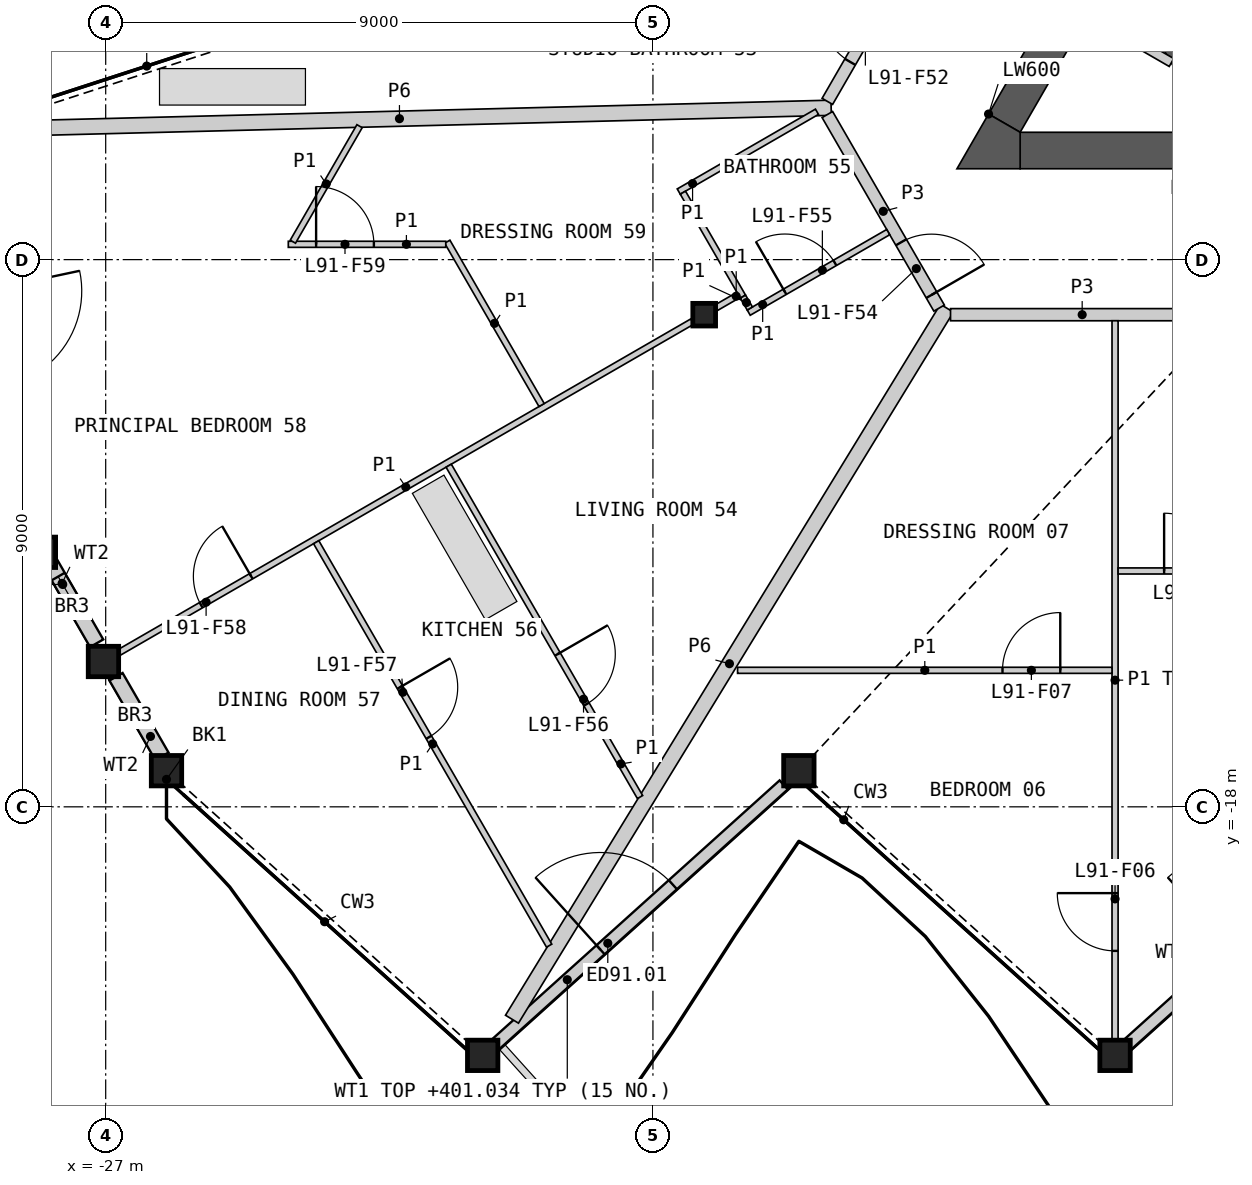
"""IFC4 building model, lengths in metres.
Left out: names, types, materials, properties, quantities, classifications, styles, units other than length and angle.
Written with IfcOpenShell. Run it as: python <this file> out.ifc"""

import sys

from ifc_helpers import new_model, si_unit, direction, frame, frame_2d, origin, origin_2d, place, context, subcontext, project, spatial, polyline, rectangle, hollow_rectangle, i_section, outline, extrude, element, fill, save


model = new_model("IFC4")
c1 = context("Model", 3, precision=1e-05, world=origin(), true_north=direction((0.0, 1.0)))
c2 = subcontext(c1, "Body", "Model", "MODEL_VIEW")
j1 = project(units=[si_unit("LENGTHUNIT", "METRE"), si_unit("PLANEANGLEUNIT", "RADIAN")], contexts=[c1])
p1 = place(None, origin())
s1 = spatial("IfcSite", under=j1, at=p1, CompositionType="ELEMENT")
p2 = place(p1, origin())
s2 = spatial("IfcBuilding", under=s1, at=p2, CompositionType="ELEMENT")
p3 = place(p2, frame((0.0, 0.0, 398.4)))
s3 = spatial("IfcBuildingStorey", under=s2, at=p3, CompositionType="ELEMENT", Elevation=398.4)
for number, where, z_axis, x_axis in (
    (1, (-26.0, -17.406, 0.0), (0.0, 0.0, 1.0), (1.0, 0.0, 0.0)),
    (2, (-20.8, -22.088, 0.0), (0.0, 0.0, 1.0), (1.0, 0.0, 0.0)),
    (3, (-15.6, -17.406, 0.0), (0.0, 0.0, 1.0), (1.0, 0.0, 0.0)),
    (4, (-10.4, -22.088, 0.0), (0.0, 0.0, 1.0), (1.0, 0.0, 0.0)),
    (5, (-28.074, -13.814, 0.0), (0.0, 0.0, 1.0), (1.0, 0.0, 0.0)),
    (6, (-27.037, -15.61, 0.0), (0.0, 0.0, 1.0), (1.0, 0.0, 0.0)),
):
    element("IfcColumn", number, at=place(p3, frame(where, z_axis=z_axis, x_axis=x_axis)), inside=s3, PredefinedType="COLUMN", context=c2, shape_type="SweptSolid", body=[
        extrude(hollow_rectangle(XDim=0.5, YDim=0.5, WallThickness=0.03, at=origin_2d()), origin(), (0.0, 0.0, 1.0), 3.4),
    ])
p4 = place(p3, frame((-17.157, -9.906, 0.0), z_axis=(0.0, 0.0, 1.0), x_axis=(1.0, 0.0, 0.0)))
e7 = element("IfcColumn", 7, at=p4, inside=s3, PredefinedType="COLUMN", context=c2, shape_type="SweptSolid", body=[
    extrude(i_section(OverallWidth=0.374, OverallDepth=0.372, WebThickness=0.016, FlangeThickness=0.026, at=origin_2d()), origin(), (0.0, 0.0, 1.0), 3.4),
])
p5 = place(p3, frame((-20.595, -21.912, 0.0), z_axis=(0.0, 0.0, 1.0), x_axis=(0.743132515916, 0.669144277259, 0.0)))
e8 = element("IfcWall", 8, at=p5, inside=s3, PredefinedType="SOLIDWALL", context=c2, shape_type="SweptSolid", body=[
    extrude(rectangle(XDim=6.385, YDim=0.2, at=frame_2d((3.192, 0.0))), origin(), (0.0, 0.0, 1.0), 2.634),
])
p6 = place(p5, frame((2.333, 0.0, 0.0)))
e9 = element("IfcOpeningElement", 9, at=p6, cuts=e8, PredefinedType="OPENING", context=c2, shape_type="SweptSolid", body=[
    extrude(rectangle(XDim=1.6, YDim=2.25, at=frame_2d((0.8, 1.125))), frame((0.0, 0.11, 0.0), z_axis=(0.0, -1.0, 0.0), x_axis=(1.0, 0.0, 0.0)), (0.0, 0.0, 1.0), 0.22),
])
p7 = place(p3, frame((-10.195, -21.912, 0.0), z_axis=(0.0, 0.0, 1.0), x_axis=(0.743132515916, 0.669144277259, 0.0)))
e10 = element("IfcWall", 10, at=p7, inside=s3, PredefinedType="SOLIDWALL", context=c2, shape_type="SweptSolid", body=[
    extrude(rectangle(XDim=6.385, YDim=0.2, at=frame_2d((3.192, 0.0))), origin(), (0.0, 0.0, 1.0), 2.634),
])
p8 = place(p7, frame((2.333, 0.0, 0.0)))
e11 = element("IfcOpeningElement", 11, at=p8, cuts=e10, PredefinedType="OPENING", context=c2, shape_type="SweptSolid", body=[
    extrude(rectangle(XDim=1.6, YDim=2.25, at=frame_2d((0.8, 1.125))), frame((0.0, 0.11, 0.0), z_axis=(0.0, -1.0, 0.0), x_axis=(1.0, 0.0, 0.0)), (0.0, 0.0, 1.0), 0.22),
])
p9 = place(p3, frame((-27.906, -13.997, 0.0), z_axis=(0.0, 0.0, 1.0), x_axis=(0.499931517724, -0.866064938435, 0.0)))
e12 = element("IfcWall", 12, at=p9, inside=s3, PredefinedType="SOLIDWALL", context=c2, shape_type="SweptSolid", body=[
    extrude(rectangle(XDim=1.516, YDim=0.25, at=frame_2d((0.758, 0.0))), origin(), (0.0, 0.0, 1.0), 2.634),
])
p10 = place(p9, frame((0.25, 0.0, 1.7)))
e13 = element("IfcOpeningElement", 13, at=p10, cuts=e12, PredefinedType="OPENING", context=c2, shape_type="SweptSolid", body=[
    extrude(rectangle(XDim=0.6, YDim=0.7, at=frame_2d((0.3, 0.35))), frame((0.0, 0.135, 0.0), z_axis=(0.0, -1.0, 0.0), x_axis=(1.0, 0.0, 0.0)), (0.0, 0.0, 1.0), 0.27),
])
p11 = place(p3, frame((-26.83, -15.861, 0.0), z_axis=(0.0, 0.0, 1.0), x_axis=(0.500048779063, -0.865997239347, 0.0)))
e14 = element("IfcWall", 14, at=p11, inside=s3, PredefinedType="SOLIDWALL", context=c2, shape_type="SweptSolid", body=[
    extrude(rectangle(XDim=1.511, YDim=0.25, at=frame_2d((0.755, 0.0))), origin(), (0.0, 0.0, 1.0), 2.634),
])
p12 = place(p3, origin())
e15 = element("IfcWall", 15, at=p12, inside=s3, PredefinedType="SHEAR", context=c2, shape_type="SweptSolid", body=[
    extrude(outline(polyline([(-10.374, -4.206), (-8.83, -6.881), (-8.738, -6.539), (-10.032, -4.298), (-10.374, -4.206)])), origin(), (0.0, 0.0, 1.0), 3.1),
])
p13 = place(p3, frame((-10.842, -4.967, 0.0), z_axis=(0.0, 0.0, 1.0), x_axis=(0.866098216386, -0.499873863663, 0.0)))
e16 = element("IfcWall", 16, at=p13, inside=s3, PredefinedType="PARTITIONING", context=c2, shape_type="SweptSolid", body=[
    extrude(rectangle(XDim=1.582, YDim=0.15, at=frame_2d((0.791, 0.0))), origin(), (0.0, 0.0, 1.0), 3.1),
])
p14 = place(p3, frame((-11.961, -7.206, 0.0), z_axis=(0.0, 0.0, 1.0), x_axis=(1.0, 0.0, 0.0)))
e17 = element("IfcWall", 17, at=p14, inside=s3, PredefinedType="SHEAR", context=c2, shape_type="SweptSolid", body=[
    extrude(rectangle(XDim=4.868, YDim=0.6, at=frame_2d((2.434, 0.0))), origin(), (0.0, 0.0, 1.0), 3.1),
])
p15 = place(p3, frame((-9.941, -2.807, 0.0), z_axis=(0.0, 0.0, 1.0), x_axis=(-0.500020646047, -0.866013483456, 0.0)))
e18 = element("IfcWall", 18, at=p15, inside=s3, PredefinedType="SHEAR", context=c2, shape_type="SweptSolid", body=[
    extrude(rectangle(XDim=4.559, YDim=0.6, at=frame_2d((2.28, 0.0))), origin(), (0.0, 0.0, 1.0), 3.1),
])
p16 = place(p3, origin())
e19 = element("IfcWall", 19, at=p16, inside=s3, PredefinedType="SHEAR", context=c2, shape_type="SweptSolid", body=[
    extrude(outline(polyline([(-12.48, -6.606), (-11.961, -6.906), (-11.961, -7.506), (-13.0, -7.506), (-12.48, -6.606)])), origin(), (0.0, 0.0, 1.0), 3.1),
])
p17 = place(p3, frame((-29.269, -6.862, 0.0), z_axis=(0.0, 0.0, 1.0), x_axis=(0.999679020594, 0.025334872878, 0.0)))
e20 = element("IfcWall", 20, at=p17, inside=s3, PredefinedType="PARTITIONING", context=c2, shape_type="SweptSolid", body=[
    extrude(rectangle(XDim=14.204, YDim=0.25, at=frame_2d((7.102, 0.0))), origin(), (0.0, 0.0, 1.0), 2.33),
])
p18 = place(p3, frame((-20.318, -21.493, 0.0), z_axis=(0.0, 0.0, 1.0), x_axis=(0.52177126778, 0.853085426039, 0.0)))
e21 = element("IfcWall", 21, at=p18, inside=s3, PredefinedType="PARTITIONING", context=c2, shape_type="SweptSolid", body=[
    extrude(rectangle(XDim=13.708, YDim=0.25, at=frame_2d((6.854, 0.0))), origin(), (0.0, 0.0, 1.0), 2.33),
])
p19 = place(p3, frame((-13.106, -9.906, 0.0), z_axis=(0.0, 0.0, 1.0), x_axis=(1.0, 0.0, 0.0)))
e22 = element("IfcWall", 22, at=p19, inside=s3, PredefinedType="PARTITIONING", context=c2, shape_type="SweptSolid", body=[
    extrude(rectangle(XDim=4.331, YDim=0.2, at=frame_2d((2.165, 0.0))), origin(), (0.0, 0.0, 1.0), 3.1),
])
p20 = place(p3, frame((-15.131, -6.397, 0.0), z_axis=(0.0, 0.0, 1.0), x_axis=(0.499986217557, 0.866033360935, 0.0)))
e23 = element("IfcWall", 23, at=p20, inside=s3, PredefinedType="PARTITIONING", context=c2, shape_type="SweptSolid", body=[
    extrude(rectangle(XDim=4.3, YDim=0.2, at=frame_2d((2.15, 0.0))), origin(), (0.0, 0.0, 1.0), 3.1),
])
p21 = place(p20, frame((0.75, 0.0, 0.0)))
e24 = element("IfcOpeningElement", 24, at=p21, cuts=e23, PredefinedType="OPENING", context=c2, shape_type="SweptSolid", body=[
    extrude(rectangle(XDim=1.0, YDim=2.1, at=frame_2d((0.5, 1.05))), frame((0.0, 0.11, 0.0), z_axis=(0.0, -1.0, 0.0), x_axis=(1.0, 0.0, 0.0)), (0.0, 0.0, 1.0), 0.22),
])
p22 = place(p3, frame((-15.131, -6.614, 0.0), z_axis=(0.0, 0.0, 1.0), x_axis=(0.499967746641, -0.866044024469, 0.0)))
e25 = element("IfcWall", 25, at=p22, inside=s3, PredefinedType="PARTITIONING", context=c2, shape_type="SweptSolid", body=[
    extrude(rectangle(XDim=3.676, YDim=0.2, at=frame_2d((1.838, 0.0))), origin(), (0.0, 0.0, 1.0), 3.1),
])
p23 = place(p22, frame((2.426, 0.0, 0.0)))
e26 = element("IfcOpeningElement", 26, at=p23, cuts=e25, PredefinedType="OPENING", context=c2, shape_type="SweptSolid", body=[
    extrude(rectangle(XDim=1.0, YDim=2.1, at=frame_2d((0.5, 1.05))), frame((0.0, 0.11, 0.0), z_axis=(0.0, -1.0, 0.0), x_axis=(1.0, 0.0, 0.0)), (0.0, 0.0, 1.0), 0.22),
])
p24 = place(p3, frame((-10.4, -21.828, 0.0), z_axis=(0.0, 0.0, 1.0), x_axis=(0.0, 1.0, 0.0)))
e27 = element("IfcWall", 27, at=p24, inside=s3, PredefinedType="PARTITIONING", context=c2, shape_type="SweptSolid", body=[
    extrude(rectangle(XDim=11.822, YDim=0.1, at=frame_2d((5.911, 0.0))), origin(), (0.0, 0.0, 1.0), 2.33),
])
p25 = place(p24, frame((1.458, 0.0, 0.0)))
e28 = element("IfcOpeningElement", 28, at=p25, cuts=e27, PredefinedType="OPENING", context=c2, shape_type="SweptSolid", body=[
    extrude(rectangle(XDim=0.95, YDim=2.1, at=frame_2d((0.475, 1.05))), frame((0.0, 0.06, 0.0), z_axis=(0.0, -1.0, 0.0), x_axis=(1.0, 0.0, 0.0)), (0.0, 0.0, 1.0), 0.12),
])
p26 = place(p3, frame((-26.777, -15.46, 0.0), z_axis=(0.0, 0.0, 1.0), x_axis=(0.866019680922, 0.500009912158, 0.0)))
e29 = element("IfcWall", 29, at=p26, inside=s3, PredefinedType="PARTITIONING", context=c2, shape_type="SweptSolid", body=[
    extrude(rectangle(XDim=10.881, YDim=0.1, at=frame_2d((5.44, 0.0))), origin(), (0.0, 0.0, 1.0), 2.33),
])
p27 = place(p26, frame((1.554, 0.0, 0.0)))
e30 = element("IfcOpeningElement", 30, at=p27, cuts=e29, PredefinedType="OPENING", context=c2, shape_type="SweptSolid", body=[
    extrude(rectangle(XDim=0.95, YDim=2.1, at=frame_2d((0.475, 1.05))), frame((0.0, 0.06, 0.0), z_axis=(0.0, -1.0, 0.0), x_axis=(1.0, 0.0, 0.0)), (0.0, 0.0, 1.0), 0.12),
])
p28 = place(p3, frame((-23.538, -13.647, 0.0), z_axis=(0.0, 0.0, 1.0), x_axis=(0.499977115003, -0.86603861604, 0.0)))
e31 = element("IfcWall", 31, at=p28, inside=s3, PredefinedType="PARTITIONING", context=c2, shape_type="SweptSolid", body=[
    extrude(rectangle(XDim=7.662, YDim=0.1, at=frame_2d((3.831, 0.0))), origin(), (0.0, 0.0, 1.0), 2.33),
])
p29 = place(p28, frame((2.755, 0.0, 0.0)))
e32 = element("IfcOpeningElement", 32, at=p29, cuts=e31, PredefinedType="OPENING", context=c2, shape_type="SweptSolid", body=[
    extrude(rectangle(XDim=0.95, YDim=2.1, at=frame_2d((0.475, 1.05))), frame((0.0, 0.06, 0.0), z_axis=(0.0, -1.0, 0.0), x_axis=(1.0, 0.0, 0.0)), (0.0, 0.0, 1.0), 0.12),
])
p30 = place(p3, frame((-21.359, -12.389, 0.0), z_axis=(0.0, 0.0, 1.0), x_axis=(0.500006767202, -0.866021496703, 0.0)))
e33 = element("IfcWall", 33, at=p30, inside=s3, PredefinedType="PARTITIONING", context=c2, shape_type="SweptSolid", body=[
    extrude(rectangle(XDim=6.293, YDim=0.1, at=frame_2d((3.147, 0.0))), origin(), (0.0, 0.0, 1.0), 2.33),
])
p31 = place(p30, frame((3.58, 0.0, 0.0)))
e34 = element("IfcOpeningElement", 34, at=p31, cuts=e33, PredefinedType="OPENING", context=c2, shape_type="SweptSolid", body=[
    extrude(rectangle(XDim=0.95, YDim=2.1, at=frame_2d((0.475, 1.05))), frame((0.0, 0.06, 0.0), z_axis=(0.0, -1.0, 0.0), x_axis=(1.0, 0.0, 0.0)), (0.0, 0.0, 1.0), 0.12),
])
p32 = place(p3, frame((-16.608, -15.755, 0.0), z_axis=(0.0, 0.0, 1.0), x_axis=(1.0, 0.0, 0.0)))
e35 = element("IfcWall", 35, at=p32, inside=s3, PredefinedType="PARTITIONING", context=c2, shape_type="SweptSolid", body=[
    extrude(rectangle(XDim=6.158, YDim=0.1, at=frame_2d((3.079, 0.0))), origin(), (0.0, 0.0, 1.0), 2.33),
])
p33 = place(p32, frame((4.357, 0.0, 0.0)))
e36 = element("IfcOpeningElement", 36, at=p33, cuts=e35, PredefinedType="OPENING", context=c2, shape_type="SweptSolid", body=[
    extrude(rectangle(XDim=0.95, YDim=2.1, at=frame_2d((0.475, 1.05))), frame((0.0, 0.06, 0.0), z_axis=(0.0, -1.0, 0.0), x_axis=(1.0, 0.0, 0.0)), (0.0, 0.0, 1.0), 0.12),
])
p34 = place(p3, frame((-10.35, -14.121, 0.0), z_axis=(0.0, 0.0, 1.0), x_axis=(1.0, 0.0, 0.0)))
e37 = element("IfcWall", 37, at=p34, inside=s3, PredefinedType="PARTITIONING", context=c2, shape_type="SweptSolid", body=[
    extrude(rectangle(XDim=5.1, YDim=0.1, at=frame_2d((2.55, 0.0))), origin(), (0.0, 0.0, 1.0), 2.33),
])
p35 = place(p34, frame((0.757, 0.0, 0.0)))
e38 = element("IfcOpeningElement", 38, at=p35, cuts=e37, PredefinedType="OPENING", context=c2, shape_type="SweptSolid", body=[
    extrude(rectangle(XDim=0.95, YDim=2.1, at=frame_2d((0.475, 1.05))), frame((0.0, 0.06, 0.0), z_axis=(0.0, -1.0, 0.0), x_axis=(1.0, 0.0, 0.0)), (0.0, 0.0, 1.0), 0.12),
])
p36 = place(p3, frame((-21.382, -8.705, 0.0), z_axis=(0.0, 0.0, 1.0), x_axis=(0.50001536203, -0.866016534331, 0.0)))
e39 = element("IfcWall", 39, at=p36, inside=s3, PredefinedType="PARTITIONING", context=c2, shape_type="SweptSolid", body=[
    extrude(rectangle(XDim=3.103, YDim=0.1, at=frame_2d((1.551, 0.0))), origin(), (0.0, 0.0, 1.0), 2.33),
])
p37 = place(p3, frame((-17.575, -7.881, 0.0), z_axis=(0.0, 0.0, 1.0), x_axis=(0.866013657776, 0.500020344131, 0.0)))
e40 = element("IfcWall", 40, at=p37, inside=s3, PredefinedType="PARTITIONING", context=c2, shape_type="SweptSolid", body=[
    extrude(rectangle(XDim=2.625, YDim=0.1, at=frame_2d((1.312, 0.0))), origin(), (0.0, 0.0, 1.0), 2.33),
])
p38 = place(p3, frame((-16.425, -9.872, 0.0), z_axis=(0.0, 0.0, 1.0), x_axis=(0.865999882481, 0.50004420159, 0.0)))
e41 = element("IfcWall", 41, at=p38, inside=s3, PredefinedType="PARTITIONING", context=c2, shape_type="SweptSolid", body=[
    extrude(rectangle(XDim=2.649, YDim=0.1, at=frame_2d((1.325, 0.0))), origin(), (0.0, 0.0, 1.0), 2.33),
])
p39 = place(p38, frame((0.686, 0.0, 0.0)))
e42 = element("IfcOpeningElement", 42, at=p39, cuts=e41, PredefinedType="OPENING", context=c2, shape_type="SweptSolid", body=[
    extrude(rectangle(XDim=0.95, YDim=2.1, at=frame_2d((0.475, 1.05))), frame((0.0, 0.06, 0.0), z_axis=(0.0, -1.0, 0.0), x_axis=(1.0, 0.0, 0.0)), (0.0, 0.0, 1.0), 0.12),
])
p40 = place(p3, frame((-23.997, -8.748, 0.0), z_axis=(0.0, 0.0, 1.0), x_axis=(1.0, 0.0, 0.0)))
e43 = element("IfcWall", 43, at=p40, inside=s3, PredefinedType="PARTITIONING", context=c2, shape_type="SweptSolid", body=[
    extrude(rectangle(XDim=2.59, YDim=0.1, at=frame_2d((1.295, 0.0))), origin(), (0.0, 0.0, 1.0), 2.33),
])
p41 = place(p40, frame((0.457, 0.0, 0.0)))
e44 = element("IfcOpeningElement", 44, at=p41, cuts=e43, PredefinedType="OPENING", context=c2, shape_type="SweptSolid", body=[
    extrude(rectangle(XDim=0.95, YDim=2.1, at=frame_2d((0.475, 1.05))), frame((0.0, 0.06, 0.0), z_axis=(0.0, -1.0, 0.0), x_axis=(1.0, 0.0, 0.0)), (0.0, 0.0, 1.0), 0.12),
])
p42 = place(p3, frame((-23.922, -8.705, 0.0), z_axis=(0.0, 0.0, 1.0), x_axis=(0.50001794124, 0.866015045157, 0.0)))
e45 = element("IfcWall", 45, at=p42, inside=s3, PredefinedType="PARTITIONING", context=c2, shape_type="SweptSolid", body=[
    extrude(rectangle(XDim=2.193, YDim=0.1, at=frame_2d((1.097, 0.0))), origin(), (0.0, 0.0, 1.0), 2.33),
])
p43 = place(p3, frame((-17.507, -7.899, 0.0), z_axis=(0.0, 0.0, 1.0), x_axis=(0.499972416139, -0.866041328748, 0.0)))
e46 = element("IfcWall", 46, at=p43, inside=s3, PredefinedType="PARTITIONING", context=c2, shape_type="SweptSolid", body=[
    extrude(rectangle(XDim=1.973, YDim=0.1, at=frame_2d((0.986, 0.0))), origin(), (0.0, 0.0, 1.0), 2.33),
])
p44 = place(p3, frame((-16.96, -9.792, 0.0), z_axis=(0.0, 0.0, 1.0), x_axis=(0.866137484628, 0.499805820016, 0.0)))
e47 = element("IfcWall", 47, at=p44, inside=s3, PredefinedType="PARTITIONING", context=c2, shape_type="SweptSolid", body=[
    extrude(rectangle(XDim=0.423, YDim=0.1, at=frame_2d((0.211, 0.0))), origin(), (0.0, 0.0, 1.0), 2.33),
])
p45 = place(p3, frame((-16.519, -9.61, 0.0), z_axis=(0.0, 0.0, 1.0), x_axis=(0.50245032488, -0.864606078528, 0.0)))
e48 = element("IfcWall", 48, at=p45, inside=s3, PredefinedType="PARTITIONING", context=c2, shape_type="SweptSolid", body=[
    extrude(rectangle(XDim=0.224, YDim=0.1, at=frame_2d((0.112, 0.0))), origin(), (0.0, 0.0, 1.0), 2.33),
])
p46 = place(p6, origin())
e49 = element("IfcDoor", 49, at=p46, inside=s3, OperationType="DOUBLE_DOOR_SINGLE_SWING", PredefinedType="DOOR", context=c2, shape_type="SweptSolid", body=[
    extrude(rectangle(XDim=1.6, YDim=2.25, at=frame_2d((0.8, 1.125))), frame((0.0, 0.025, 0.0), z_axis=(0.0, -1.0, 0.0), x_axis=(1.0, 0.0, 0.0)), (0.0, 0.0, 1.0), 0.05),
])
fill(e9, e49)
p47 = place(p10, origin())
e50 = element("IfcWindow", 50, at=p47, inside=s3, PartitioningType="SINGLE_PANEL", PredefinedType="WINDOW", context=c2, shape_type="SweptSolid", body=[
    extrude(rectangle(XDim=0.6, YDim=0.7, at=frame_2d((0.3, 0.35))), frame((0.0, 0.03, 0.0), z_axis=(0.0, -1.0, 0.0), x_axis=(1.0, 0.0, 0.0)), (0.0, 0.0, 1.0), 0.06),
])
fill(e13, e50)
p48 = place(p35, origin())
e51 = element("IfcDoor", 51, at=p48, inside=s3, OperationType="SINGLE_SWING_LEFT", PredefinedType="DOOR", context=c2, shape_type="SweptSolid", body=[
    extrude(rectangle(XDim=0.95, YDim=2.1, at=frame_2d((0.475, 1.05))), frame((0.0, 0.025, 0.0), z_axis=(0.0, -1.0, 0.0), x_axis=(1.0, 0.0, 0.0)), (0.0, 0.0, 1.0), 0.05),
])
fill(e38, e51)
p49 = place(p25, origin())
e52 = element("IfcDoor", 52, at=p49, inside=s3, OperationType="SINGLE_SWING_RIGHT", PredefinedType="DOOR", context=c2, shape_type="SweptSolid", body=[
    extrude(rectangle(XDim=0.95, YDim=2.1, at=frame_2d((0.475, 1.05))), frame((0.0, 0.025, 0.0), z_axis=(0.0, -1.0, 0.0), x_axis=(1.0, 0.0, 0.0)), (0.0, 0.0, 1.0), 0.05),
])
fill(e28, e52)
p50 = place(p33, origin())
e53 = element("IfcDoor", 53, at=p50, inside=s3, OperationType="SINGLE_SWING_RIGHT", PredefinedType="DOOR", context=c2, shape_type="SweptSolid", body=[
    extrude(rectangle(XDim=0.95, YDim=2.1, at=frame_2d((0.475, 1.05))), frame((0.0, 0.025, 0.0), z_axis=(0.0, -1.0, 0.0), x_axis=(1.0, 0.0, 0.0)), (0.0, 0.0, 1.0), 0.05),
])
fill(e36, e53)
p51 = place(p21, origin())
e54 = element("IfcDoor", 54, at=p51, inside=s3, OperationType="SINGLE_SWING_RIGHT", PredefinedType="DOOR", context=c2, shape_type="SweptSolid", body=[
    extrude(rectangle(XDim=1.0, YDim=2.1, at=frame_2d((0.5, 1.05))), frame((0.0, 0.025, 0.0), z_axis=(0.0, -1.0, 0.0), x_axis=(1.0, 0.0, 0.0)), (0.0, 0.0, 1.0), 0.05),
])
fill(e24, e54)
p52 = place(p23, origin())
e55 = element("IfcDoor", 55, at=p52, inside=s3, OperationType="SINGLE_SWING_RIGHT", PredefinedType="DOOR", context=c2, shape_type="SweptSolid", body=[
    extrude(rectangle(XDim=1.0, YDim=2.1, at=frame_2d((0.5, 1.05))), frame((0.0, 0.025, 0.0), z_axis=(0.0, -1.0, 0.0), x_axis=(1.0, 0.0, 0.0)), (0.0, 0.0, 1.0), 0.05),
])
fill(e26, e55)
p53 = place(p39, origin())
e56 = element("IfcDoor", 56, at=p53, inside=s3, OperationType="SINGLE_SWING_LEFT", PredefinedType="DOOR", context=c2, shape_type="SweptSolid", body=[
    extrude(rectangle(XDim=0.95, YDim=2.1, at=frame_2d((0.475, 1.05))), frame((0.0, 0.025, 0.0), z_axis=(0.0, -1.0, 0.0), x_axis=(1.0, 0.0, 0.0)), (0.0, 0.0, 1.0), 0.05),
])
fill(e42, e56)
p54 = place(p31, origin())
e57 = element("IfcDoor", 57, at=p54, inside=s3, OperationType="SINGLE_SWING_LEFT", PredefinedType="DOOR", context=c2, shape_type="SweptSolid", body=[
    extrude(rectangle(XDim=0.95, YDim=2.1, at=frame_2d((0.475, 1.05))), frame((0.0, 0.025, 0.0), z_axis=(0.0, -1.0, 0.0), x_axis=(1.0, 0.0, 0.0)), (0.0, 0.0, 1.0), 0.05),
])
fill(e34, e57)
p55 = place(p29, origin())
e58 = element("IfcDoor", 58, at=p55, inside=s3, OperationType="SINGLE_SWING_LEFT", PredefinedType="DOOR", context=c2, shape_type="SweptSolid", body=[
    extrude(rectangle(XDim=0.95, YDim=2.1, at=frame_2d((0.475, 1.05))), frame((0.0, 0.025, 0.0), z_axis=(0.0, -1.0, 0.0), x_axis=(1.0, 0.0, 0.0)), (0.0, 0.0, 1.0), 0.05),
])
fill(e32, e58)
p56 = place(p27, origin())
e59 = element("IfcDoor", 59, at=p56, inside=s3, OperationType="SINGLE_SWING_RIGHT", PredefinedType="DOOR", context=c2, shape_type="SweptSolid", body=[
    extrude(rectangle(XDim=0.95, YDim=2.1, at=frame_2d((0.475, 1.05))), frame((0.0, 0.025, 0.0), z_axis=(0.0, -1.0, 0.0), x_axis=(1.0, 0.0, 0.0)), (0.0, 0.0, 1.0), 0.05),
])
fill(e30, e59)
p57 = place(p41, origin())
e60 = element("IfcDoor", 60, at=p57, inside=s3, OperationType="SINGLE_SWING_LEFT", PredefinedType="DOOR", context=c2, shape_type="SweptSolid", body=[
    extrude(rectangle(XDim=0.95, YDim=2.1, at=frame_2d((0.475, 1.05))), frame((0.0, 0.025, 0.0), z_axis=(0.0, -1.0, 0.0), x_axis=(1.0, 0.0, 0.0)), (0.0, 0.0, 1.0), 0.05),
])
fill(e44, e60)
save(model, sys.argv[1])
